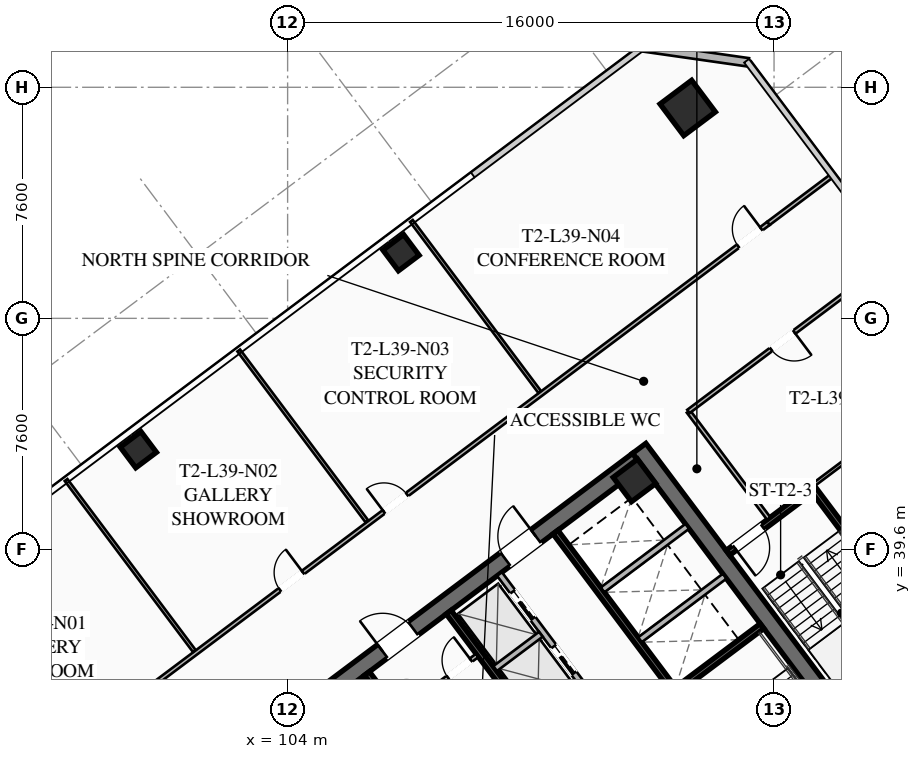
"""IFC4 building model, lengths in metres.
Left out: names, types, materials, properties, quantities, classifications, styles, units other than length and angle.
Written with IfcOpenShell. Run it as: python <this file> out.ifc"""

import sys

from ifc_helpers import new_model, si_unit, direction, frame, frame_2d, origin, origin_2d, place, context, subcontext, project, spatial, rectangle, hollow_rectangle, extrude, element, fill, save


model = new_model("IFC4")
c1 = context("Model", 3, precision=1e-05, world=origin(), true_north=direction((0.0, 1.0)))
c2 = subcontext(c1, "Body", "Model", "MODEL_VIEW")
j1 = project(units=[si_unit("LENGTHUNIT", "METRE"), si_unit("PLANEANGLEUNIT", "RADIAN")], contexts=[c1])
p1 = place(None, origin())
s1 = spatial("IfcSite", under=j1, at=p1, CompositionType="ELEMENT")
p2 = place(p1, origin())
s2 = spatial("IfcBuilding", under=s1, at=p2, CompositionType="ELEMENT")
p3 = place(p2, frame((0.0, 0.0, 146.35)))
s3 = spatial("IfcBuildingStorey", under=s2, at=p3, CompositionType="ELEMENT", Elevation=146.35)
p4 = place(p3, frame((115.564, 42.923, 0.0), z_axis=(0.0, 0.0, 1.0), x_axis=(0.600005007985, -0.799996243986, 0.0)))
e1 = element("IfcWall", 1, at=p4, inside=s3, PredefinedType="SHEAR", context=c2, shape_type="SweptSolid", body=[
    extrude(rectangle(XDim=15.6, YDim=0.55, at=frame_2d((7.8, 0.0))), origin(), (0.0, 0.0, 1.0), 3.55),
])
p5 = place(p3, frame((103.461, 33.502, 0.0), z_axis=(0.0, 0.0, 1.0), x_axis=(0.799998054672, 0.600002593761, 0.0)))
e2 = element("IfcWall", 2, at=p5, inside=s3, PredefinedType="SHEAR", context=c2, shape_type="SweptSolid", body=[
    extrude(rectangle(XDim=15.06, YDim=0.55, at=frame_2d((7.53, 0.0))), origin(), (0.0, 0.0, 1.0), 3.55),
])
p6 = place(p5, frame((4.58, 0.0, 0.0)))
e3 = element("IfcOpeningElement", 3, at=p6, cuts=e2, PredefinedType="OPENING", context=c2, shape_type="SweptSolid", body=[
    extrude(rectangle(XDim=1.25, YDim=2.25, at=frame_2d((0.625, 1.125))), frame((0.0, 0.285, 0.0), z_axis=(0.0, -1.0, 0.0), x_axis=(1.0, 0.0, 0.0)), (0.0, 0.0, 1.0), 0.57),
])
p7 = place(p5, frame((9.63, 0.0, 0.0)))
e4 = element("IfcOpeningElement", 4, at=p7, cuts=e2, PredefinedType="OPENING", context=c2, shape_type="SweptSolid", body=[
    extrude(rectangle(XDim=1.25, YDim=2.25, at=frame_2d((0.625, 1.125))), frame((0.0, 0.285, 0.0), z_axis=(0.0, -1.0, 0.0), x_axis=(1.0, 0.0, 0.0)), (0.0, 0.0, 1.0), 0.57),
])
p8 = place(p3, frame((115.41, 41.87, 0.0), z_axis=(0.0, 0.0, 1.0), x_axis=(0.799999996291, 0.600000004945, 0.0)))
e5 = element("IfcColumn", 5, at=p8, inside=s3, PredefinedType="COLUMN", context=c2, shape_type="SweptSolid", body=[
    extrude(hollow_rectangle(XDim=1.0, YDim=1.0, WallThickness=0.04, at=origin_2d()), origin(), (0.0, 0.0, 1.0), 3.37),
])
p9 = place(p3, frame((117.16, 54.12, 0.0), z_axis=(0.0, 0.0, 1.0), x_axis=(0.799999996291, 0.600000004945, 0.0)))
e6 = element("IfcColumn", 6, at=p9, inside=s3, PredefinedType="COLUMN", context=c2, shape_type="SweptSolid", body=[
    extrude(hollow_rectangle(XDim=1.3, YDim=1.3, WallThickness=0.05, at=origin_2d()), origin(), (0.0, 0.0, 1.0), 3.37),
])
for number, where, z_axis, x_axis in (
    (7, (107.73, 49.36, 0.0), (0.0, 0.0, 1.0), (0.8, 0.6, 0.0)),
    (8, (99.09, 42.88, 0.0), (0.0, 0.0, 1.0), (0.8, 0.6, 0.0)),
):
    element("IfcColumn", number, at=place(p3, frame(where, z_axis=z_axis, x_axis=x_axis)), inside=s3, PredefinedType="COLUMN", context=c2, shape_type="SweptSolid", body=[
        extrude(hollow_rectangle(XDim=0.85, YDim=0.85, WallThickness=0.035, at=origin_2d()), origin(), (0.0, 0.0, 1.0), 3.37),
    ])
p10 = place(p3, frame((115.66, 56.12, 0.0), z_axis=(0.0, 0.0, 1.0), x_axis=(0.989949493661, -0.141421356237, 0.0)))
e9 = element("IfcWall", 9, at=p10, inside=s3, PredefinedType="SOLIDWALL", context=c2, shape_type="SweptSolid", body=[
    extrude(rectangle(XDim=3.536, YDim=0.28, at=frame_2d((1.768, 0.0))), origin(), (0.0, 0.0, 1.0), 3.37),
])
p11 = place(p3, frame((111.44, 29.08, 0.0), z_axis=(0.0, 0.0, 1.0), x_axis=(-0.59999029481, 0.8000072788, 0.0)))
e10 = element("IfcWall", 10, at=p11, inside=s3, PredefinedType="SHEAR", context=c2, shape_type="SweptSolid", body=[
    extrude(rectangle(XDim=8.05, YDim=0.2, at=frame_2d((4.025, 0.0))), origin(), (0.0, 0.0, 1.0), 3.37),
])
p12 = place(p11, frame((0.45, 0.0, 0.0)))
e11 = element("IfcOpeningElement", 11, at=p12, cuts=e10, PredefinedType="OPENING", context=c2, shape_type="SweptSolid", body=[
    extrude(rectangle(XDim=1.15, YDim=2.2, at=frame_2d((0.575, 1.1))), frame((0.0, 0.11, 0.0), z_axis=(0.0, -1.0, 0.0), x_axis=(1.0, 0.0, 0.0)), (0.0, 0.0, 1.0), 0.22),
])
p13 = place(p3, frame((116.54, 34.78, 0.0), z_axis=(0.0, 0.0, 1.0), x_axis=(0.800015298837, 0.599979601008, 0.0)))
e12 = element("IfcWall", 12, at=p13, inside=s3, PredefinedType="SHEAR", context=c2, shape_type="SweptSolid", body=[
    extrude(rectangle(XDim=3.83, YDim=0.2, at=frame_2d((1.915, 0.0))), origin(), (0.0, 0.0, 1.0), 3.37),
])
p14 = place(p3, frame((117.998, 25.936, 0.0), z_axis=(0.0, 0.0, 1.0), x_axis=(-0.600002693989, 0.799997979501, 0.0)))
e13 = element("IfcWall", 13, at=p14, inside=s3, PredefinedType="SHEAR", context=c2, shape_type="SweptSolid", body=[
    extrude(rectangle(XDim=14.5, YDim=0.2, at=frame_2d((7.25, 0.0))), origin(), (0.0, 0.0, 1.0), 3.37),
])
p15 = place(p3, frame((112.81, 40.17, 0.0), z_axis=(0.0, 0.0, 1.0), x_axis=(0.599993943644, -0.800004542231, 0.0)))
e14 = element("IfcWall", 14, at=p15, inside=s3, PredefinedType="SHEAR", context=c2, shape_type="SweptSolid", body=[
    extrude(rectangle(XDim=6.45, YDim=0.2, at=frame_2d((3.225, 0.0))), origin(), (0.0, 0.0, 1.0), 3.37),
])
for number, where, z_axis, x_axis in (
    (15, (115.59, 36.63, 0.0), (0.0, 0.0, 1.0), (0.8, 0.6, 0.0)),
    (16, (114.36, 38.27, 0.0), (0.0, 0.0, 1.0), (0.8, 0.6, 0.0)),
):
    element("IfcWall", number, at=place(p3, frame(where, z_axis=z_axis, x_axis=x_axis)), inside=s3, PredefinedType="SOLIDWALL", context=c2, shape_type="SweptSolid", body=[
        extrude(rectangle(XDim=3.48, YDim=0.2, at=frame_2d((1.74, 0.0))), origin(), (0.0, 0.0, 1.0), 3.37),
    ])
p16 = place(p3, frame((107.71, 34.22, 0.0), z_axis=(0.0, 0.0, 1.0), x_axis=(0.799981399002, 0.60002480053, 0.0)))
e17 = element("IfcWall", 17, at=p16, inside=s3, PredefinedType="PARTITIONING", context=c2, shape_type="SweptSolid", body=[
    extrude(rectangle(XDim=3.15, YDim=0.135, at=frame_2d((1.575, 0.0))), origin(), (0.0, 0.0, 1.0), 2.723),
])
p17 = place(p16, frame((0.25, 0.0, 0.0)))
e18 = element("IfcOpeningElement", 18, at=p17, cuts=e17, PredefinedType="OPENING", context=c2, shape_type="SweptSolid", body=[
    extrude(rectangle(XDim=0.95, YDim=2.05, at=frame_2d((0.475, 1.025))), frame((0.0, 0.077, 0.0), z_axis=(0.0, -1.0, 0.0), x_axis=(1.0, 0.0, 0.0)), (0.0, 0.0, 1.0), 0.155),
])
p18 = place(p16, frame((1.95, 0.0, 0.0)))
e19 = element("IfcOpeningElement", 19, at=p18, cuts=e17, PredefinedType="OPENING", context=c2, shape_type="SweptSolid", body=[
    extrude(rectangle(XDim=0.95, YDim=2.05, at=frame_2d((0.475, 1.025))), frame((0.0, 0.077, 0.0), z_axis=(0.0, -1.0, 0.0), x_axis=(1.0, 0.0, 0.0)), (0.0, 0.0, 1.0), 0.155),
])
p19 = place(p3, frame((115.11, 33.27, 0.0), z_axis=(0.0, 0.0, 1.0), x_axis=(-0.600011322243, 0.799991508192, 0.0)))
e20 = element("IfcWall", 20, at=p19, inside=s3, PredefinedType="SOLIDWALL", context=c2, shape_type="SweptSolid", body=[
    extrude(rectangle(XDim=6.9, YDim=0.2, at=frame_2d((3.45, 0.0))), origin(), (0.0, 0.0, 1.0), 3.37),
])
p20 = place(p19, frame((0.575, 0.0, 0.0)))
e21 = element("IfcOpeningElement", 21, at=p20, cuts=e20, PredefinedType="OPENING", context=c2, shape_type="SweptSolid", body=[
    extrude(rectangle(XDim=1.1, YDim=2.2, at=frame_2d((0.55, 1.1))), frame((0.0, 0.11, 0.0), z_axis=(0.0, -1.0, 0.0), x_axis=(1.0, 0.0, 0.0)), (0.0, 0.0, 1.0), 0.22),
])
p21 = place(p19, frame((2.825, 0.0, 0.0)))
e22 = element("IfcOpeningElement", 22, at=p21, cuts=e20, PredefinedType="OPENING", context=c2, shape_type="SweptSolid", body=[
    extrude(rectangle(XDim=1.1, YDim=2.2, at=frame_2d((0.55, 1.1))), frame((0.0, 0.11, 0.0), z_axis=(0.0, -1.0, 0.0), x_axis=(1.0, 0.0, 0.0)), (0.0, 0.0, 1.0), 0.22),
])
p22 = place(p19, frame((5.075, 0.0, 0.0)))
e23 = element("IfcOpeningElement", 23, at=p22, cuts=e20, PredefinedType="OPENING", context=c2, shape_type="SweptSolid", body=[
    extrude(rectangle(XDim=1.1, YDim=2.2, at=frame_2d((0.55, 1.1))), frame((0.0, 0.11, 0.0), z_axis=(0.0, -1.0, 0.0), x_axis=(1.0, 0.0, 0.0)), (0.0, 0.0, 1.0), 0.22),
])
p23 = place(p3, frame((110.826, 35.682, 0.0), z_axis=(0.0, 0.0, 1.0), x_axis=(0.799984418148, 0.600020775241, 0.0)))
e24 = element("IfcWall", 24, at=p23, inside=s3, PredefinedType="SOLIDWALL", context=c2, shape_type="SweptSolid", body=[
    extrude(rectangle(XDim=1.88, YDim=0.2, at=frame_2d((0.94, 0.0))), origin(), (0.0, 0.0, 1.0), 3.37),
])
p24 = place(p3, frame((125.304, 36.228, 0.0), z_axis=(0.0, 0.0, 1.0), x_axis=(-0.59998851072, 0.800008616831, 0.0)))
e25 = element("IfcWall", 25, at=p24, inside=s3, PredefinedType="SHEAR", context=c2, shape_type="SweptSolid", body=[
    extrude(rectangle(XDim=6.8, YDim=0.2, at=frame_2d((3.4, 0.0))), origin(), (0.0, 0.0, 1.0), 3.37),
])
p25 = place(p3, frame((121.204, 41.528, 0.0), z_axis=(0.0, 0.0, 1.0), x_axis=(-0.800017232136, -0.599977023131, 0.0)))
e26 = element("IfcWall", 26, at=p25, inside=s3, PredefinedType="SHEAR", context=c2, shape_type="SweptSolid", body=[
    extrude(rectangle(XDim=3.4, YDim=0.2, at=frame_2d((1.7, 0.0))), origin(), (0.0, 0.0, 1.0), 3.37),
])
p26 = place(p25, frame((1.975, 0.0, 0.0)))
e27 = element("IfcOpeningElement", 27, at=p26, cuts=e26, PredefinedType="OPENING", context=c2, shape_type="SweptSolid", body=[
    extrude(rectangle(XDim=1.15, YDim=2.2, at=frame_2d((0.575, 1.1))), frame((0.0, 0.11, 0.0), z_axis=(0.0, -1.0, 0.0), x_axis=(1.0, 0.0, 0.0)), (0.0, 0.0, 1.0), 0.22),
])
p27 = place(p3, frame((119.824, 40.618, 0.0), z_axis=(0.0, 0.0, 1.0), x_axis=(-0.599982243973, 0.800013316712, 0.0)))
e28 = element("IfcWall", 28, at=p27, inside=s3, PredefinedType="PARTITIONING", context=c2, shape_type="SweptSolid", body=[
    extrude(rectangle(XDim=4.4, YDim=0.135, at=frame_2d((2.2, 0.0))), origin(), (0.0, 0.0, 1.0), 2.723),
])
p28 = place(p3, frame((94.778, 31.546, 0.0), z_axis=(0.0, 0.0, 1.0), x_axis=(0.8, 0.6, 0.0)))
e29 = element("IfcWall", 29, at=p28, inside=s3, PredefinedType="PARTITIONING", context=c2, shape_type="SweptSolid", body=[
    extrude(rectangle(XDim=31.3, YDim=0.135, at=frame_2d((15.65, 0.0))), origin(), (0.0, 0.0, 1.0), 2.723),
])
p29 = place(p28, frame((0.3, 0.0, 0.0)))
e30 = element("IfcOpeningElement", 30, at=p29, cuts=e29, PredefinedType="OPENING", context=c2, shape_type="SweptSolid", body=[
    extrude(rectangle(XDim=0.95, YDim=2.05, at=frame_2d((0.475, 1.025))), frame((0.0, 0.077, 0.0), z_axis=(0.0, -1.0, 0.0), x_axis=(1.0, 0.0, 0.0)), (0.0, 0.0, 1.0), 0.155),
])
p30 = place(p28, frame((11.21, 0.0, 0.0)))
e31 = element("IfcOpeningElement", 31, at=p30, cuts=e29, PredefinedType="OPENING", context=c2, shape_type="SweptSolid", body=[
    extrude(rectangle(XDim=0.95, YDim=2.05, at=frame_2d((0.475, 1.025))), frame((0.0, 0.077, 0.0), z_axis=(0.0, -1.0, 0.0), x_axis=(1.0, 0.0, 0.0)), (0.0, 0.0, 1.0), 0.155),
])
p31 = place(p28, frame((15.487, 0.0, 0.0)))
e32 = element("IfcOpeningElement", 32, at=p31, cuts=e29, PredefinedType="OPENING", context=c2, shape_type="SweptSolid", body=[
    extrude(rectangle(XDim=0.95, YDim=2.05, at=frame_2d((0.475, 1.025))), frame((0.0, 0.077, 0.0), z_axis=(0.0, -1.0, 0.0), x_axis=(1.0, 0.0, 0.0)), (0.0, 0.0, 1.0), 0.155),
])
p32 = place(p28, frame((30.05, 0.0, 0.0)))
e33 = element("IfcOpeningElement", 33, at=p32, cuts=e29, PredefinedType="OPENING", context=c2, shape_type="SweptSolid", body=[
    extrude(rectangle(XDim=0.95, YDim=2.05, at=frame_2d((0.475, 1.025))), frame((0.0, 0.077, 0.0), z_axis=(0.0, -1.0, 0.0), x_axis=(1.0, 0.0, 0.0)), (0.0, 0.0, 1.0), 0.155),
])
p33 = place(p3, frame((119.818, 50.326, 0.0), z_axis=(0.0, 0.0, 1.0), x_axis=(0.799977721118, 0.600029704027, 0.0)))
e34 = element("IfcWall", 34, at=p33, inside=s3, PredefinedType="PARTITIONING", context=c2, shape_type="SweptSolid", body=[
    extrude(rectangle(XDim=2.63, YDim=0.135, at=frame_2d((1.315, 0.0))), origin(), (0.0, 0.0, 1.0), 2.723),
])
for number, where, z_axis, x_axis in (
    (35, (100.93, 36.26, 0.0), (0.0, 0.0, 1.0), (-0.6, 0.8, 0.0)),
    (36, (106.61, 40.52, 0.0), (0.0, 0.0, 1.0), (-0.6, 0.8, 0.0)),
    (37, (112.29, 44.78, 0.0), (0.0, 0.0, 1.0), (-0.6, 0.8, 0.0)),
):
    element("IfcWall", number, at=place(p3, frame(where, z_axis=z_axis, x_axis=x_axis)), inside=s3, PredefinedType="PARTITIONING", context=c2, shape_type="SweptSolid", body=[
        extrude(rectangle(XDim=7.03, YDim=0.11, at=frame_2d((3.515, 0.0))), origin(), (0.0, 0.0, 1.0), 2.723),
    ])
p34 = place(p3, frame((123.824, 49.118, 0.0), z_axis=(0.0, 0.0, 1.0), x_axis=(-0.799996470201, -0.60000470637, 0.0)))
e38 = element("IfcWall", 38, at=p34, inside=s3, PredefinedType="PARTITIONING", context=c2, shape_type="SweptSolid", body=[
    extrude(rectangle(XDim=8.3, YDim=0.135, at=frame_2d((4.15, 0.0))), origin(), (0.0, 0.0, 1.0), 2.723),
])
p35 = place(p34, frame((3.95, 0.0, 0.0)))
e39 = element("IfcOpeningElement", 39, at=p35, cuts=e38, PredefinedType="OPENING", context=c2, shape_type="SweptSolid", body=[
    extrude(rectangle(XDim=0.95, YDim=2.05, at=frame_2d((0.475, 1.025))), frame((0.0, 0.077, 0.0), z_axis=(0.0, -1.0, 0.0), x_axis=(1.0, 0.0, 0.0)), (0.0, 0.0, 1.0), 0.155),
])
p36 = place(p3, frame((126.464, 45.598, 0.0), z_axis=(0.0, 0.0, 1.0), x_axis=(-0.8000181681, -0.599975775102, 0.0)))
e40 = element("IfcWall", 40, at=p36, inside=s3, PredefinedType="PARTITIONING", context=c2, shape_type="SweptSolid", body=[
    extrude(rectangle(XDim=6.45, YDim=0.11, at=frame_2d((3.225, 0.0))), origin(), (0.0, 0.0, 1.0), 2.723),
])
p37 = place(p6, origin())
e41 = element("IfcDoor", 41, at=p37, inside=s3, OperationType="SINGLE_SWING_LEFT", PredefinedType="DOOR", context=c2, shape_type="SweptSolid", body=[
    extrude(rectangle(XDim=1.25, YDim=2.25, at=frame_2d((0.625, 1.125))), frame((0.0, 0.025, 0.0), z_axis=(0.0, -1.0, 0.0), x_axis=(1.0, 0.0, 0.0)), (0.0, 0.0, 1.0), 0.05),
])
fill(e3, e41)
p38 = place(p7, origin())
e42 = element("IfcDoor", 42, at=p38, inside=s3, OperationType="SINGLE_SWING_RIGHT", PredefinedType="DOOR", context=c2, shape_type="SweptSolid", body=[
    extrude(rectangle(XDim=1.25, YDim=2.25, at=frame_2d((0.625, 1.125))), frame((0.0, 0.025, 0.0), z_axis=(0.0, -1.0, 0.0), x_axis=(1.0, 0.0, 0.0)), (0.0, 0.0, 1.0), 0.05),
])
fill(e4, e42)
p39 = place(p18, origin())
e43 = element("IfcDoor", 43, at=p39, inside=s3, OperationType="SINGLE_SWING_RIGHT", PredefinedType="DOOR", context=c2, shape_type="SweptSolid", body=[
    extrude(rectangle(XDim=0.95, YDim=2.05, at=frame_2d((0.475, 1.025))), frame((0.0, 0.025, 0.0), z_axis=(0.0, -1.0, 0.0), x_axis=(1.0, 0.0, 0.0)), (0.0, 0.0, 1.0), 0.05),
])
fill(e19, e43)
p40 = place(p26, origin())
e44 = element("IfcDoor", 44, at=p40, inside=s3, OperationType="SINGLE_SWING_RIGHT", PredefinedType="DOOR", context=c2, shape_type="SweptSolid", body=[
    extrude(rectangle(XDim=1.15, YDim=2.2, at=frame_2d((0.575, 1.1))), frame((0.0, 0.025, 0.0), z_axis=(0.0, -1.0, 0.0), x_axis=(1.0, 0.0, 0.0)), (0.0, 0.0, 1.0), 0.05),
])
fill(e27, e44)
p41 = place(p30, origin())
e45 = element("IfcDoor", 45, at=p41, inside=s3, OperationType="SINGLE_SWING_RIGHT", PredefinedType="DOOR", context=c2, shape_type="SweptSolid", body=[
    extrude(rectangle(XDim=0.95, YDim=2.05, at=frame_2d((0.475, 1.025))), frame((0.0, 0.025, 0.0), z_axis=(0.0, -1.0, 0.0), x_axis=(1.0, 0.0, 0.0)), (0.0, 0.0, 1.0), 0.05),
])
fill(e31, e45)
p42 = place(p31, origin())
e46 = element("IfcDoor", 46, at=p42, inside=s3, OperationType="SINGLE_SWING_LEFT", PredefinedType="DOOR", context=c2, shape_type="SweptSolid", body=[
    extrude(rectangle(XDim=0.95, YDim=2.05, at=frame_2d((0.475, 1.025))), frame((0.0, 0.025, 0.0), z_axis=(0.0, -1.0, 0.0), x_axis=(1.0, 0.0, 0.0)), (0.0, 0.0, 1.0), 0.05),
])
fill(e32, e46)
p43 = place(p32, origin())
e47 = element("IfcDoor", 47, at=p43, inside=s3, OperationType="SINGLE_SWING_RIGHT", PredefinedType="DOOR", context=c2, shape_type="SweptSolid", body=[
    extrude(rectangle(XDim=0.95, YDim=2.05, at=frame_2d((0.475, 1.025))), frame((0.0, 0.025, 0.0), z_axis=(0.0, -1.0, 0.0), x_axis=(1.0, 0.0, 0.0)), (0.0, 0.0, 1.0), 0.05),
])
fill(e33, e47)
p44 = place(p35, origin())
e48 = element("IfcDoor", 48, at=p44, inside=s3, OperationType="SINGLE_SWING_LEFT", PredefinedType="DOOR", context=c2, shape_type="SweptSolid", body=[
    extrude(rectangle(XDim=0.95, YDim=2.05, at=frame_2d((0.475, 1.025))), frame((0.0, 0.025, 0.0), z_axis=(0.0, -1.0, 0.0), x_axis=(1.0, 0.0, 0.0)), (0.0, 0.0, 1.0), 0.05),
])
fill(e39, e48)
p45 = place(p21, origin())
e49 = element("IfcDoor", 49, at=p45, inside=s3, OperationType="SLIDING_TO_LEFT", PredefinedType="DOOR", context=c2, shape_type="SweptSolid", body=[
    extrude(rectangle(XDim=1.1, YDim=2.2, at=frame_2d((0.55, 1.1))), frame((0.0, 0.025, 0.0), z_axis=(0.0, -1.0, 0.0), x_axis=(1.0, 0.0, 0.0)), (0.0, 0.0, 1.0), 0.05),
])
fill(e22, e49)
p46 = place(p22, origin())
e50 = element("IfcDoor", 50, at=p46, inside=s3, OperationType="SLIDING_TO_LEFT", PredefinedType="DOOR", context=c2, shape_type="SweptSolid", body=[
    extrude(rectangle(XDim=1.1, YDim=2.2, at=frame_2d((0.55, 1.1))), frame((0.0, 0.025, 0.0), z_axis=(0.0, -1.0, 0.0), x_axis=(1.0, 0.0, 0.0)), (0.0, 0.0, 1.0), 0.05),
])
fill(e23, e50)
save(model, sys.argv[1])
